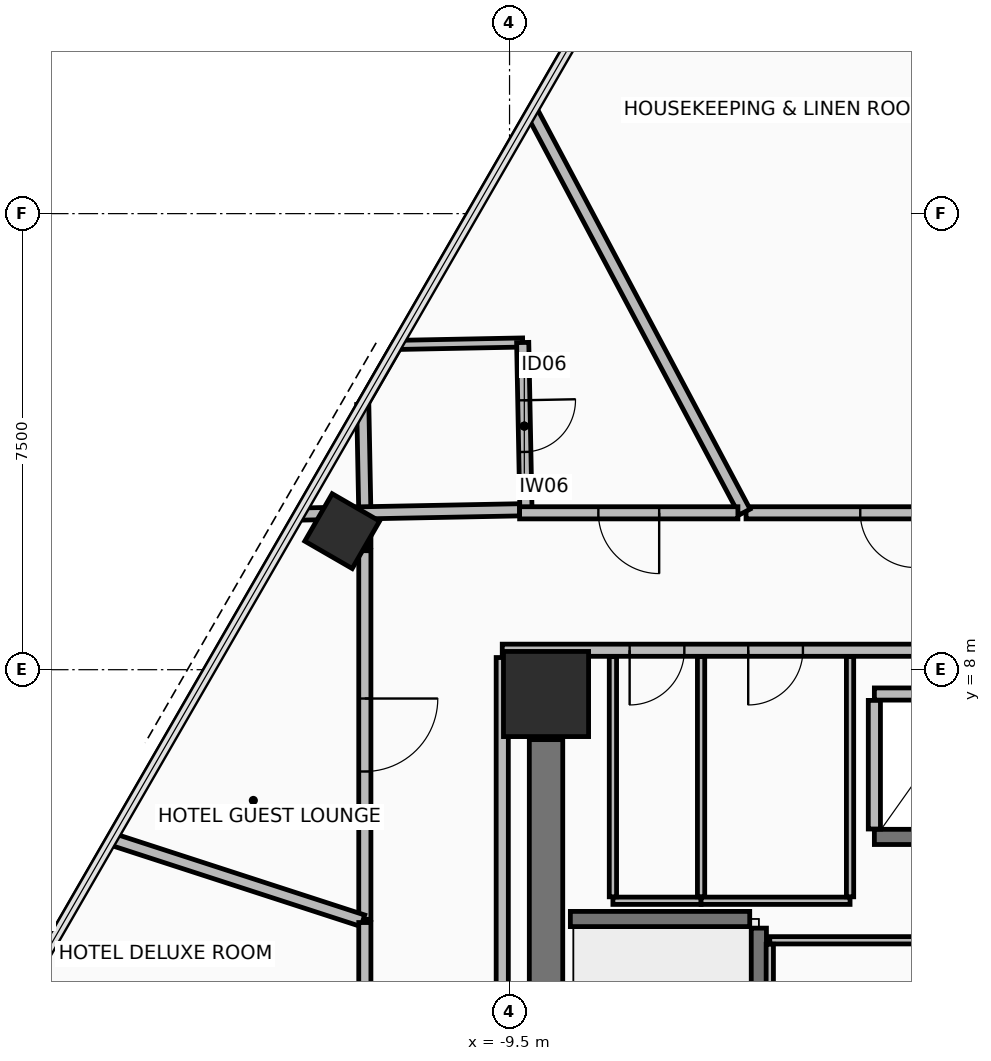
"""IFC4 building model, lengths in metres.
Left out: names, types, materials, properties, quantities, classifications, styles, units other than length and angle.
Written with IfcOpenShell. Run it as: python <this file> out.ifc"""

import sys

from ifc_helpers import new_model, si_unit, direction, frame, frame_2d, origin, origin_2d, place, context, subcontext, project, spatial, rectangle, hollow_rectangle, extrude, element, fill, save


model = new_model("IFC4")
c1 = context("Model", 3, precision=1e-05, world=origin(), true_north=direction((0.0, 1.0)))
c2 = subcontext(c1, "Body", "Model", "MODEL_VIEW")
j1 = project(units=[si_unit("LENGTHUNIT", "METRE"), si_unit("PLANEANGLEUNIT", "RADIAN")], contexts=[c1])
p1 = place(None, origin())
s1 = spatial("IfcSite", under=j1, at=p1, CompositionType="ELEMENT")
p2 = place(p1, origin())
s2 = spatial("IfcBuilding", under=s1, at=p2, CompositionType="ELEMENT")
p3 = place(p2, frame((0.0, 0.0, 38.65)))
s3 = spatial("IfcBuildingStorey", under=s2, at=p3, CompositionType="ELEMENT", Elevation=38.65)
p4 = place(p3, frame((-8.9, 7.6, 0.0), z_axis=(0.0, 0.0, 1.0), x_axis=(1.0, 0.0, 0.0)))
e1 = element("IfcColumn", 1, at=p4, inside=s3, PredefinedType="COLUMN", context=c2, shape_type="SweptSolid", body=[
    extrude(rectangle(XDim=1.4, YDim=1.4, at=origin_2d()), origin(), (0.0, 0.0, 1.0), 3.4),
])
p5 = place(p3, frame((-12.252, 10.279, 0.0), z_axis=(0.0, 0.0, 1.0), x_axis=(0.500001511499, 0.866024531118, 0.0)))
e2 = element("IfcColumn", 2, at=p5, inside=s3, PredefinedType="COLUMN", context=c2, shape_type="SweptSolid", body=[
    extrude(hollow_rectangle(XDim=0.9, YDim=0.9, WallThickness=0.05, at=origin_2d()), origin(), (0.0, 0.0, 1.0), 3.4),
])
p6 = place(p3, frame((-8.9, -3.85, 0.0), z_axis=(0.0, 0.0, 1.0), x_axis=(0.0, 1.0, 0.0)))
e3 = element("IfcWall", 3, at=p6, inside=s3, PredefinedType="SHEAR", context=c2, shape_type="SweptSolid", body=[
    extrude(rectangle(XDim=10.7, YDim=0.55, at=frame_2d((5.35, 0.0))), origin(), (0.0, 0.0, 1.0), 3.225),
])
p7 = place(p3, frame((9.62, 8.32, 0.0), z_axis=(0.0, 0.0, 1.0), x_axis=(-1.0, 0.0, 0.0)))
e4 = element("IfcWall", 4, at=p7, inside=s3, PredefinedType="PARTITIONING", context=c2, shape_type="SweptSolid", body=[
    extrude(rectangle(XDim=19.24, YDim=0.2, at=frame_2d((9.62, 0.0))), origin(), (0.0, 0.0, 1.0), 2.57),
])
p8 = place(p7, frame((16.245, 0.0, 0.0)))
e5 = element("IfcOpeningElement", 5, at=p8, cuts=e4, PredefinedType="OPENING", context=c2, shape_type="SweptSolid", body=[
    extrude(rectangle(XDim=0.9, YDim=2.1, at=frame_2d((0.45, 1.05))), frame((0.0, 0.11, 0.0), z_axis=(0.0, -1.0, 0.0), x_axis=(1.0, 0.0, 0.0)), (0.0, 0.0, 1.0), 0.22),
])
p9 = place(p7, frame((14.295, 0.0, 0.0)))
e6 = element("IfcOpeningElement", 6, at=p9, cuts=e4, PredefinedType="OPENING", context=c2, shape_type="SweptSolid", body=[
    extrude(rectangle(XDim=0.9, YDim=2.1, at=frame_2d((0.45, 1.05))), frame((0.0, 0.11, 0.0), z_axis=(0.0, -1.0, 0.0), x_axis=(1.0, 0.0, 0.0)), (0.0, 0.0, 1.0), 0.22),
])
p10 = place(p3, frame((-9.62, 8.2, 0.0), z_axis=(0.0, 0.0, 1.0), x_axis=(0.0, -1.0, 0.0)))
e7 = element("IfcWall", 7, at=p10, inside=s3, PredefinedType="PARTITIONING", context=c2, shape_type="SweptSolid", body=[
    extrude(rectangle(XDim=16.4, YDim=0.2, at=frame_2d((8.2, 0.0))), origin(), (0.0, 0.0, 1.0), 2.62),
])
p11 = place(p10, frame((12.65, 0.0, 0.0)))
e8 = element("IfcOpeningElement", 8, at=p11, cuts=e7, PredefinedType="OPENING", context=c2, shape_type="SweptSolid", body=[
    extrude(rectangle(XDim=1.1, YDim=2.15, at=frame_2d((0.55, 1.075))), frame((0.0, 0.11, 0.0), z_axis=(0.0, -1.0, 0.0), x_axis=(1.0, 0.0, 0.0)), (0.0, 0.0, 1.0), 0.22),
])
p12 = place(p3, frame((-5.4, -3.55, 0.0), z_axis=(0.0, 0.0, 1.0), x_axis=(0.0, 1.0, 0.0)))
e9 = element("IfcWall", 9, at=p12, inside=s3, PredefinedType="SHEAR", context=c2, shape_type="SweptSolid", body=[
    extrude(rectangle(XDim=7.3, YDim=0.25, at=frame_2d((3.65, 0.0))), origin(), (0.0, 0.0, 1.0), 3.225),
])
p13 = place(p3, frame((-8.5, 3.9, 0.0), z_axis=(0.0, 0.0, 1.0), x_axis=(1.0, 0.0, 0.0)))
e10 = element("IfcWall", 10, at=p13, inside=s3, PredefinedType="SHEAR", context=c2, shape_type="SweptSolid", body=[
    extrude(rectangle(XDim=2.95, YDim=0.25, at=frame_2d((1.475, 0.0))), origin(), (0.0, 0.0, 1.0), 3.225),
])
p14 = place(p3, frame((-3.5, 5.25, 0.0), z_axis=(0.0, 0.0, 1.0), x_axis=(1.0, 0.0, 0.0)))
e11 = element("IfcWall", 11, at=p14, inside=s3, PredefinedType="SHEAR", context=c2, shape_type="SweptSolid", body=[
    extrude(rectangle(XDim=1.712, YDim=0.25, at=frame_2d((0.856, 0.0))), origin(), (0.0, 0.0, 1.0), 3.225),
])
p15 = place(p3, frame((-3.5, 7.6, 0.0), z_axis=(0.0, 0.0, 1.0), x_axis=(1.0, 0.0, 0.0)))
e12 = element("IfcWall", 12, at=p15, inside=s3, PredefinedType="PARTITIONING", context=c2, shape_type="SweptSolid", body=[
    extrude(rectangle(XDim=0.7, YDim=0.2, at=frame_2d((0.35, 0.0))), origin(), (0.0, 0.0, 1.0), 2.42),
])
p16 = place(p3, frame((-3.5, 5.38, 0.0), z_axis=(0.0, 0.0, 1.0), x_axis=(0.0, 1.0, 0.0)))
e13 = element("IfcWall", 13, at=p16, inside=s3, PredefinedType="PARTITIONING", context=c2, shape_type="SweptSolid", body=[
    extrude(rectangle(XDim=2.115, YDim=0.2, at=frame_2d((1.058, 0.0))), origin(), (0.0, 0.0, 1.0), 2.42),
])
p17 = place(p3, frame((-1.815, 3.55, 0.0), z_axis=(0.0, 0.0, 1.0), x_axis=(-1.0, 0.0, 0.0)))
e14 = element("IfcWall", 14, at=p17, inside=s3, PredefinedType="PARTITIONING", context=c2, shape_type="SweptSolid", body=[
    extrude(rectangle(XDim=3.405, YDim=0.12, at=frame_2d((1.703, 0.0))), origin(), (0.0, 0.0, 1.0), 3.225),
])
p18 = place(p3, frame((-5.22, 3.485, 0.0), z_axis=(0.0, 0.0, 1.0), x_axis=(0.0, -1.0, 0.0)))
e15 = element("IfcWall", 15, at=p18, inside=s3, PredefinedType="PARTITIONING", context=c2, shape_type="SweptSolid", body=[
    extrude(rectangle(XDim=1.14, YDim=0.12, at=frame_2d((0.57, 0.0))), origin(), (0.0, 0.0, 1.0), 3.225),
])
p19 = place(p3, frame((-7.8, 4.2, 0.0), z_axis=(0.0, 0.0, 1.0), x_axis=(1.0, 0.0, 0.0)))
e16 = element("IfcWall", 16, at=p19, inside=s3, PredefinedType="PARTITIONING", context=c2, shape_type="SweptSolid", body=[
    extrude(rectangle(XDim=1.45, YDim=0.12, at=frame_2d((0.725, 0.0))), origin(), (0.0, 0.0, 1.0), 3.225),
])
for number, where, z_axis, x_axis in (
    (17, (-6.35, 4.265, 0.0), (0.0, 0.0, 1.0), (0.0, 1.0, 0.0)),
    (18, (-7.8, 8.215, 0.0), (0.0, 0.0, 1.0), (0.0, -1.0, 0.0)),
):
    element("IfcWall", number, at=place(p3, frame(where, z_axis=z_axis, x_axis=x_axis)), inside=s3, PredefinedType="PARTITIONING", context=c2, shape_type="SweptSolid", body=[
        extrude(rectangle(XDim=3.95, YDim=0.12, at=frame_2d((1.975, 0.0))), origin(), (0.0, 0.0, 1.0), 2.42),
    ])
p20 = place(p3, frame((-6.35, 4.2, 0.0), z_axis=(0.0, 0.0, 1.0), x_axis=(1.0, 0.0, 0.0)))
e19 = element("IfcWall", 19, at=p20, inside=s3, PredefinedType="PARTITIONING", context=c2, shape_type="SweptSolid", body=[
    extrude(rectangle(XDim=2.45, YDim=0.12, at=frame_2d((1.225, 0.0))), origin(), (0.0, 0.0, 1.0), 3.225),
])
p21 = place(p3, frame((-3.9, 4.265, 0.0), z_axis=(0.0, 0.0, 1.0), x_axis=(0.0, 1.0, 0.0)))
e20 = element("IfcWall", 20, at=p21, inside=s3, PredefinedType="PARTITIONING", context=c2, shape_type="SweptSolid", body=[
    extrude(rectangle(XDim=3.95, YDim=0.12, at=frame_2d((1.975, 0.0))), origin(), (0.0, 0.0, 1.0), 2.42),
])
p22 = place(p3, frame((-11.88, 10.58, 0.0), z_axis=(0.0, 0.0, 1.0), x_axis=(-0.019437728898, 0.9998110695, 0.0)))
e21 = element("IfcWall", 21, at=p22, inside=s3, PredefinedType="PARTITIONING", context=c2, shape_type="SweptSolid", body=[
    extrude(rectangle(XDim=1.783, YDim=0.2, at=frame_2d((0.892, 0.0))), origin(), (0.0, 0.0, 1.0), 2.42),
])
p23 = place(p3, frame((-11.915, 12.363, 0.0), z_axis=(0.0, 0.0, 1.0), x_axis=(0.499884734746, 0.866091941983, 0.0)))
e22 = element("IfcWall", 22, at=p23, inside=s3, PredefinedType="PARTITIONING", context=c2, shape_type="SweptSolid", body=[
    extrude(rectangle(XDim=1.129, YDim=0.15, at=frame_2d((0.564, 0.0))), origin(), (0.0, 0.0, 1.0), 3.225),
])
p24 = place(p3, frame((-11.35, 13.341, 0.0), z_axis=(0.0, 0.0, 1.0), x_axis=(0.99981237896, 0.019370257549, 0.0)))
e23 = element("IfcWall", 23, at=p24, inside=s3, PredefinedType="PARTITIONING", context=c2, shape_type="SweptSolid", body=[
    extrude(rectangle(XDim=2.067, YDim=0.15, at=frame_2d((1.034, 0.0))), origin(), (0.0, 0.0, 1.0), 2.42),
])
p25 = place(p3, frame((-9.284, 13.381, 0.0), z_axis=(0.0, 0.0, 1.0), x_axis=(0.019353504647, -0.999812703389, 0.0)))
e24 = element("IfcWall", 24, at=p25, inside=s3, PredefinedType="PARTITIONING", context=c2, shape_type="SweptSolid", body=[
    extrude(rectangle(XDim=2.75, YDim=0.2, at=frame_2d((1.375, 0.0))), origin(), (0.0, 0.0, 1.0), 3.225),
])
p26 = place(p25, frame((0.95, 0.0, 0.0)))
e25 = element("IfcOpeningElement", 25, at=p26, cuts=e24, PredefinedType="OPENING", context=c2, shape_type="SweptSolid", body=[
    extrude(rectangle(XDim=0.85, YDim=2.1, at=frame_2d((0.425, 1.05))), frame((0.0, 0.11, 0.0), z_axis=(0.0, -1.0, 0.0), x_axis=(1.0, 0.0, 0.0)), (0.0, 0.0, 1.0), 0.22),
])
p27 = place(p3, frame((-9.335, 10.629, 0.0), z_axis=(0.0, 0.0, 1.0), x_axis=(-0.999811508702, -0.019415124705, 0.0)))
e26 = element("IfcWall", 26, at=p27, inside=s3, PredefinedType="PARTITIONING", context=c2, shape_type="SweptSolid", body=[
    extrude(rectangle(XDim=3.622, YDim=0.2, at=frame_2d((1.811, 0.0))), origin(), (0.0, 0.0, 1.0), 2.42),
])
p28 = place(p3, frame((-0.953, 10.58, 0.0), z_axis=(0.0, 0.0, 1.0), x_axis=(-1.0, 0.0, 0.0)))
e27 = element("IfcWall", 27, at=p28, inside=s3, PredefinedType="PARTITIONING", context=c2, shape_type="SweptSolid", body=[
    extrude(rectangle(XDim=4.658, YDim=0.2, at=frame_2d((2.329, 0.0))), origin(), (0.0, 0.0, 1.0), 3.225),
])
p29 = place(p28, frame((1.879, 0.0, 0.0)))
e28 = element("IfcOpeningElement", 28, at=p29, cuts=e27, PredefinedType="OPENING", context=c2, shape_type="SweptSolid", body=[
    extrude(rectangle(XDim=0.9, YDim=2.1, at=frame_2d((0.45, 1.05))), frame((0.0, 0.11, 0.0), z_axis=(0.0, -1.0, 0.0), x_axis=(1.0, 0.0, 0.0)), (0.0, 0.0, 1.0), 0.22),
])
p30 = place(p3, frame((-5.633, 10.593, 0.0), z_axis=(0.0, 0.0, 1.0), x_axis=(-0.469464495308, 0.882951350668, 0.0)))
e29 = element("IfcWall", 29, at=p30, inside=s3, PredefinedType="PARTITIONING", context=c2, shape_type="SweptSolid", body=[
    extrude(rectangle(XDim=7.445, YDim=0.2, at=frame_2d((3.722, 0.0))), origin(), (0.0, 0.0, 1.0), 2.42),
])
p31 = place(p3, frame((-11.88, 10.475, 0.0), z_axis=(0.0, 0.0, 1.0), x_axis=(0.0, -1.0, 0.0)))
e30 = element("IfcWall", 30, at=p31, inside=s3, PredefinedType="PARTITIONING", context=c2, shape_type="SweptSolid", body=[
    extrude(rectangle(XDim=0.453, YDim=0.2, at=frame_2d((0.226, 0.0))), origin(), (0.0, 0.0, 1.0), 2.42),
])
p32 = place(p3, frame((-11.985, 10.057, 0.0), z_axis=(0.0, 0.0, 1.0), x_axis=(-0.76613026962, 0.642685311776, 0.0)))
e31 = element("IfcWall", 31, at=p32, inside=s3, PredefinedType="PARTITIONING", context=c2, shape_type="SweptSolid", body=[
    extrude(rectangle(XDim=0.633, YDim=0.2, at=frame_2d((0.316, 0.0))), origin(), (0.0, 0.0, 1.0), 2.42),
])
p33 = place(p3, frame((-5.744, 10.58, 0.0), z_axis=(0.0, 0.0, 1.0), x_axis=(-1.0, 0.0, 0.0)))
e32 = element("IfcWall", 32, at=p33, inside=s3, PredefinedType="PARTITIONING", context=c2, shape_type="SweptSolid", body=[
    extrude(rectangle(XDim=3.59, YDim=0.2, at=frame_2d((1.795, 0.0))), origin(), (0.0, 0.0, 1.0), 2.62),
])
p34 = place(p33, frame((1.295, 0.0, 0.0)))
e33 = element("IfcOpeningElement", 33, at=p34, cuts=e32, PredefinedType="OPENING", context=c2, shape_type="SweptSolid", body=[
    extrude(rectangle(XDim=1.0, YDim=2.15, at=frame_2d((0.5, 1.075))), frame((0.0, 0.11, 0.0), z_axis=(0.0, -1.0, 0.0), x_axis=(1.0, 0.0, 0.0)), (0.0, 0.0, 1.0), 0.22),
])
p35 = place(p3, frame((-11.88, 9.957, 0.0), z_axis=(0.0, 0.0, 1.0), x_axis=(0.0, -1.0, 0.0)))
e34 = element("IfcWall", 34, at=p35, inside=s3, PredefinedType="PARTITIONING", context=c2, shape_type="SweptSolid", body=[
    extrude(rectangle(XDim=6.062, YDim=0.2, at=frame_2d((3.031, 0.0))), origin(), (0.0, 0.0, 1.0), 2.62),
])
p36 = place(p35, frame((2.431, 0.0, 0.0)))
e35 = element("IfcOpeningElement", 35, at=p36, cuts=e34, PredefinedType="OPENING", context=c2, shape_type="SweptSolid", body=[
    extrude(rectangle(XDim=1.2, YDim=2.15, at=frame_2d((0.6, 1.075))), frame((0.0, 0.11, 0.0), z_axis=(0.0, -1.0, 0.0), x_axis=(1.0, 0.0, 0.0)), (0.0, 0.0, 1.0), 0.22),
])
p37 = place(p3, frame((-11.913, 3.871, 0.0), z_axis=(0.0, 0.0, 1.0), x_axis=(-0.951056374556, 0.309017430603, 0.0)))
e36 = element("IfcWall", 36, at=p37, inside=s3, PredefinedType="PARTITIONING", context=c2, shape_type="SweptSolid", body=[
    extrude(rectangle(XDim=4.343, YDim=0.2, at=frame_2d((2.171, 0.0))), origin(), (0.0, 0.0, 1.0), 2.42),
])
p38 = place(p3, frame((-11.88, 3.842, 0.0), z_axis=(0.0, 0.0, 1.0), x_axis=(0.0, -1.0, 0.0)))
e37 = element("IfcWall", 37, at=p38, inside=s3, PredefinedType="PARTITIONING", context=c2, shape_type="SweptSolid", body=[
    extrude(rectangle(XDim=4.858, YDim=0.2, at=frame_2d((2.429, 0.0))), origin(), (0.0, 0.0, 1.0), 3.225),
])
p39 = place(p38, frame((1.649, 0.0, 0.0)))
e38 = element("IfcOpeningElement", 38, at=p39, cuts=e37, PredefinedType="OPENING", context=c2, shape_type="SweptSolid", body=[
    extrude(rectangle(XDim=1.0, YDim=2.15, at=frame_2d((0.5, 1.075))), frame((0.0, 0.11, 0.0), z_axis=(0.0, -1.0, 0.0), x_axis=(1.0, 0.0, 0.0)), (0.0, 0.0, 1.0), 0.22),
])
p40 = place(p8, frame((0.9, 0.0, 0.0), z_axis=(0.0, 0.0, 1.0), x_axis=(-1.0, 0.0, 0.0)))
e39 = element("IfcDoor", 39, at=p40, inside=s3, OperationType="SINGLE_SWING_LEFT", PredefinedType="DOOR", context=c2, shape_type="SweptSolid", body=[
    extrude(rectangle(XDim=0.9, YDim=2.1, at=frame_2d((0.45, 1.05))), frame((0.0, 0.025, 0.0), z_axis=(0.0, -1.0, 0.0), x_axis=(1.0, 0.0, 0.0)), (0.0, 0.0, 1.0), 0.05),
])
fill(e5, e39)
p41 = place(p9, frame((0.9, 0.0, 0.0), z_axis=(0.0, 0.0, 1.0), x_axis=(-1.0, 0.0, 0.0)))
e40 = element("IfcDoor", 40, at=p41, inside=s3, OperationType="SINGLE_SWING_LEFT", PredefinedType="DOOR", context=c2, shape_type="SweptSolid", body=[
    extrude(rectangle(XDim=0.9, YDim=2.1, at=frame_2d((0.45, 1.05))), frame((0.0, 0.025, 0.0), z_axis=(0.0, -1.0, 0.0), x_axis=(1.0, 0.0, 0.0)), (0.0, 0.0, 1.0), 0.05),
])
fill(e6, e40)
p42 = place(p26, origin())
e41 = element("IfcDoor", 41, at=p42, inside=s3, OperationType="SINGLE_SWING_RIGHT", PredefinedType="DOOR", context=c2, shape_type="SweptSolid", body=[
    extrude(rectangle(XDim=0.85, YDim=2.1, at=frame_2d((0.425, 1.05))), frame((0.0, 0.025, 0.0), z_axis=(0.0, -1.0, 0.0), x_axis=(1.0, 0.0, 0.0)), (0.0, 0.0, 1.0), 0.05),
])
fill(e25, e41)
p43 = place(p29, origin())
e42 = element("IfcDoor", 42, at=p43, inside=s3, OperationType="SINGLE_SWING_LEFT", PredefinedType="DOOR", context=c2, shape_type="SweptSolid", body=[
    extrude(rectangle(XDim=0.9, YDim=2.1, at=frame_2d((0.45, 1.05))), frame((0.0, 0.025, 0.0), z_axis=(0.0, -1.0, 0.0), x_axis=(1.0, 0.0, 0.0)), (0.0, 0.0, 1.0), 0.05),
])
fill(e28, e42)
p44 = place(p34, origin())
e43 = element("IfcDoor", 43, at=p44, inside=s3, OperationType="SINGLE_SWING_LEFT", PredefinedType="DOOR", context=c2, shape_type="SweptSolid", body=[
    extrude(rectangle(XDim=1.0, YDim=2.15, at=frame_2d((0.5, 1.075))), frame((0.0, 0.025, 0.0), z_axis=(0.0, -1.0, 0.0), x_axis=(1.0, 0.0, 0.0)), (0.0, 0.0, 1.0), 0.05),
])
fill(e33, e43)
p45 = place(p36, origin())
e44 = element("IfcDoor", 44, at=p45, inside=s3, OperationType="SINGLE_SWING_LEFT", PredefinedType="DOOR", context=c2, shape_type="SweptSolid", body=[
    extrude(rectangle(XDim=1.2, YDim=2.15, at=frame_2d((0.6, 1.075))), frame((0.0, 0.025, 0.0), z_axis=(0.0, -1.0, 0.0), x_axis=(1.0, 0.0, 0.0)), (0.0, 0.0, 1.0), 0.05),
])
fill(e35, e44)
save(model, sys.argv[1])
